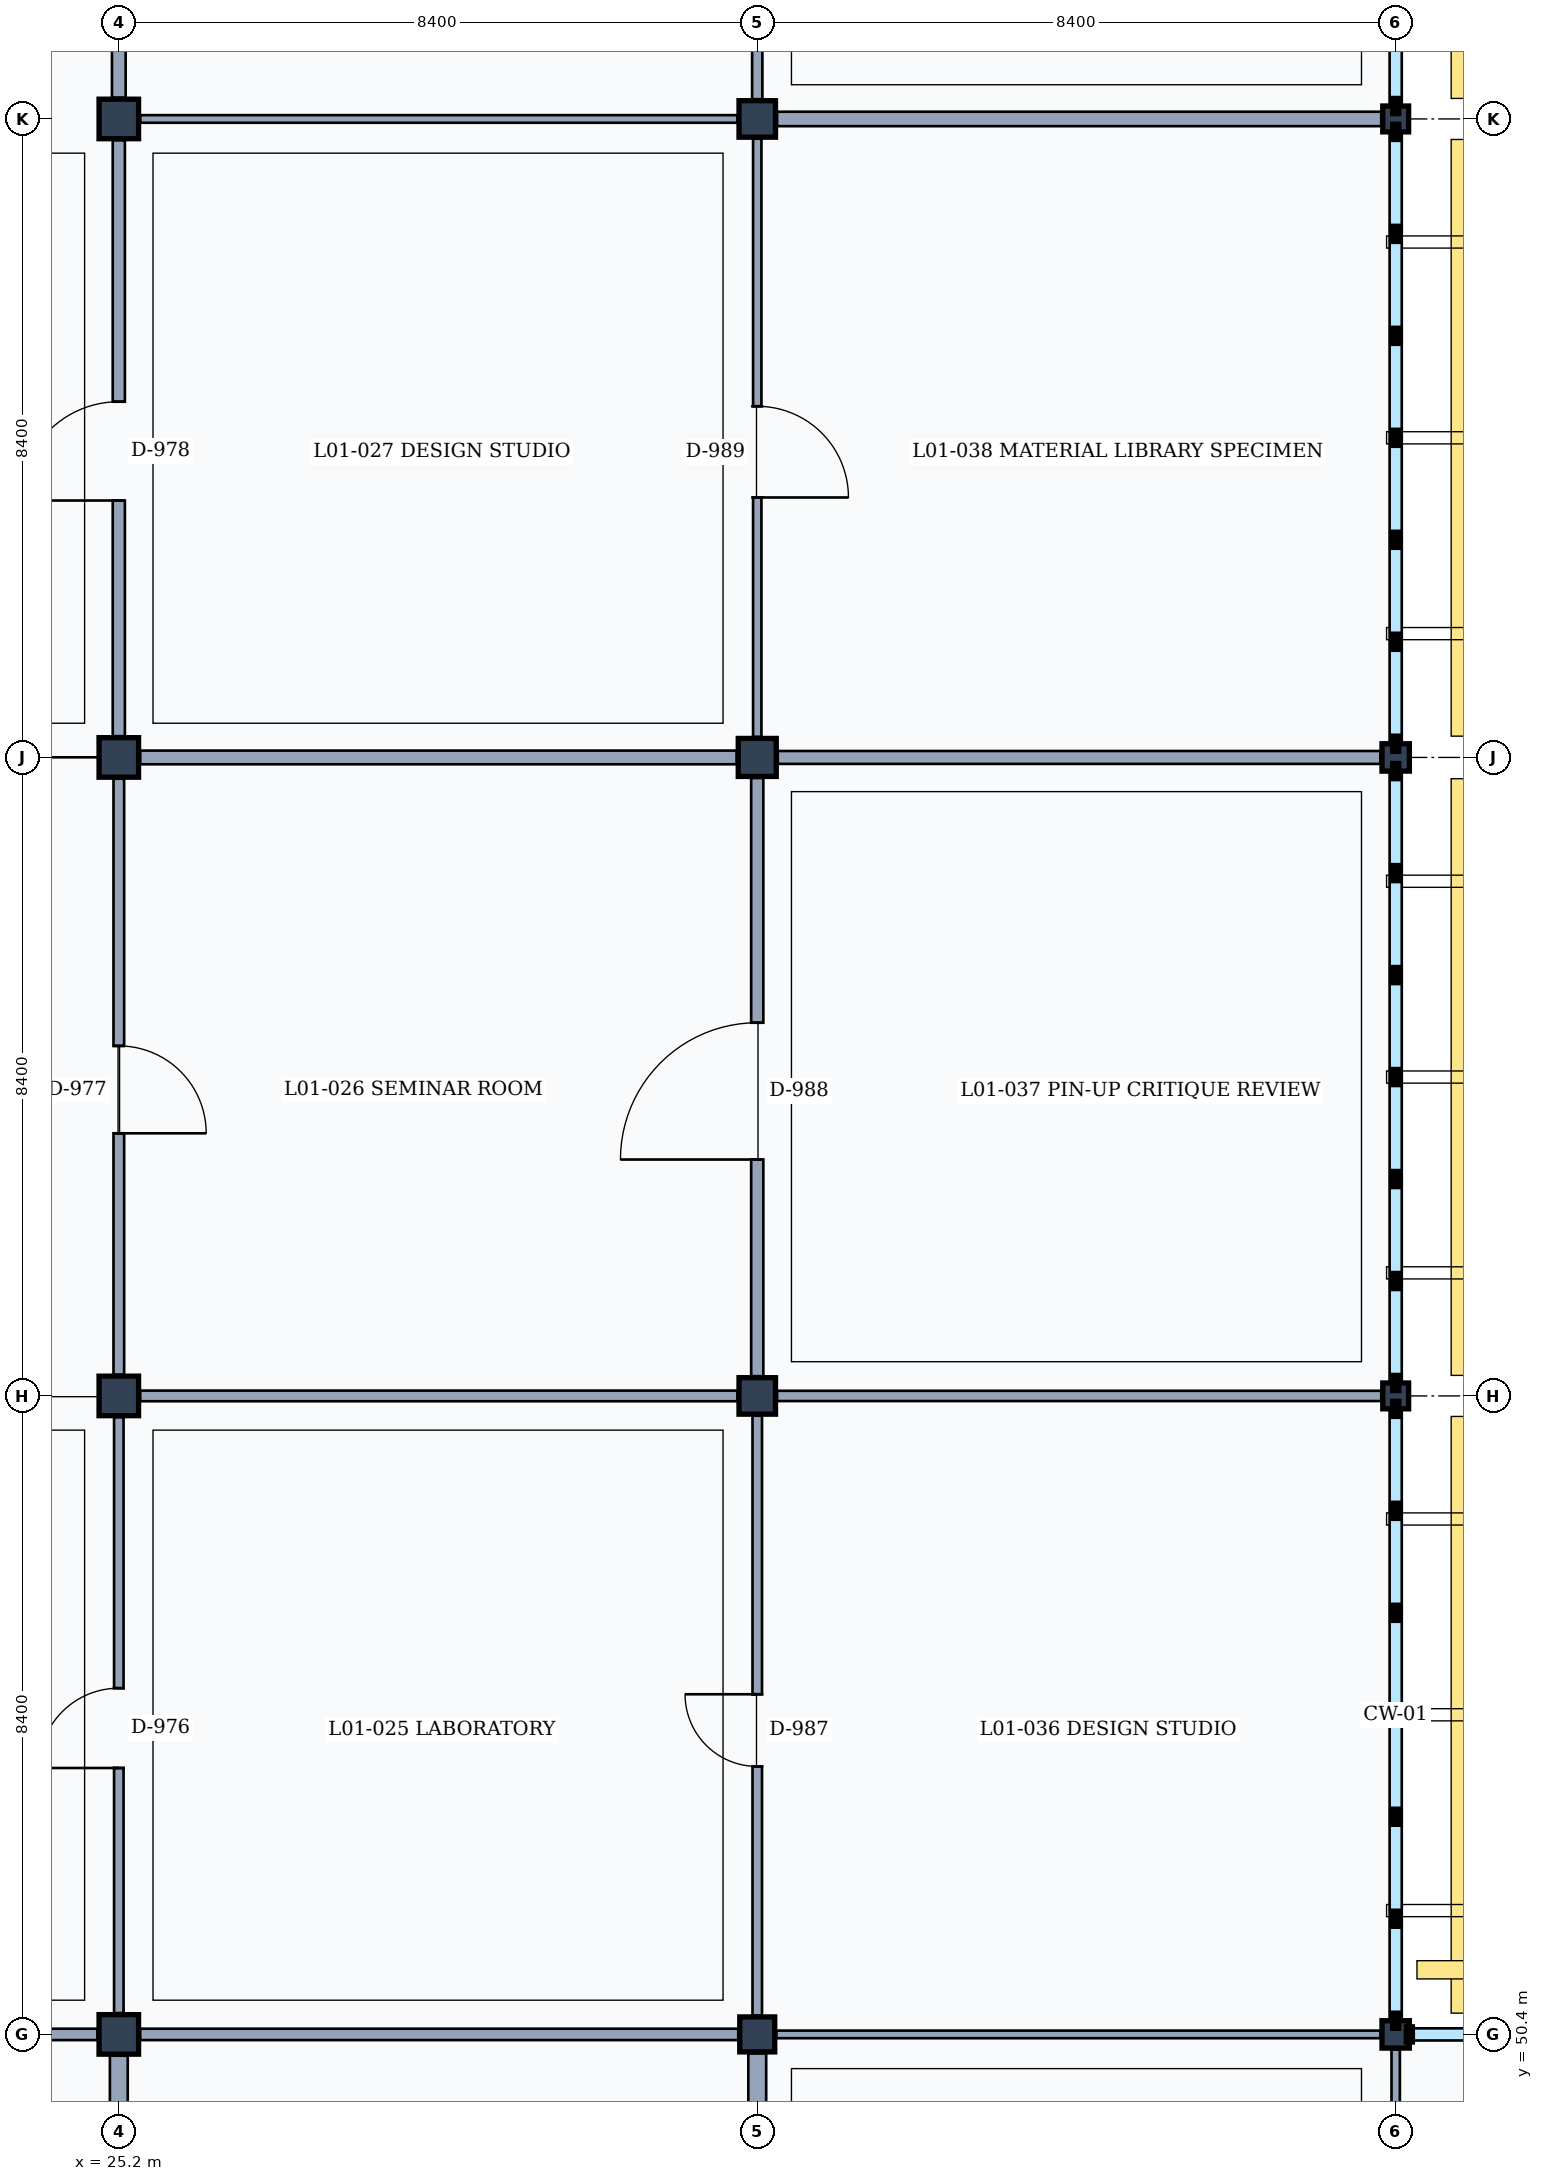
"""IFC4 building model, lengths in metres.
Left out: names, types, materials, properties, quantities, classifications, styles, units other than length and angle.
Written with IfcOpenShell. Run it as: python <this file> out.ifc"""

import sys

from ifc_helpers import new_model, si_unit, direction, frame, frame_2d, origin, origin_2d, place, context, subcontext, project, spatial, rectangle, extrude, element, fill, save


model = new_model("IFC4")
c1 = context("Model", 3, precision=1e-05, world=origin(), true_north=direction((0.0, 1.0)))
c2 = subcontext(c1, "Body", "Model", "MODEL_VIEW")
j1 = project(units=[si_unit("LENGTHUNIT", "METRE"), si_unit("PLANEANGLEUNIT", "RADIAN")], contexts=[c1])
p1 = place(None, origin())
s1 = spatial("IfcSite", under=j1, at=p1, CompositionType="ELEMENT")
p2 = place(p1, origin())
s2 = spatial("IfcBuilding", under=s1, at=p2, CompositionType="ELEMENT")
p3 = place(p2, frame((0.0, 0.0, 4.8)))
s3 = spatial("IfcBuildingStorey", under=s2, at=p3, CompositionType="ELEMENT", Elevation=4.8)
for number, where, z_axis, x_axis in (
    (1, (25.2, 50.4, 0.0), (0.0, 0.0, 1.0), (1.0, 0.0, 0.0)),
    (2, (25.2, 58.8, 0.0), (0.0, 0.0, 1.0), (1.0, 0.0, 0.0)),
    (3, (25.2, 67.2, 0.0), (0.0, 0.0, 1.0), (1.0, 0.0, 0.0)),
    (4, (25.2, 75.6, 0.0), (0.0, 0.0, 1.0), (1.0, 0.0, 0.0)),
):
    element("IfcColumn", number, at=place(p3, frame(where, z_axis=z_axis, x_axis=x_axis)), inside=s3, PredefinedType="COLUMN", context=c2, shape_type="SweptSolid", body=[
        extrude(rectangle(XDim=0.52, YDim=0.52, at=origin_2d()), origin(), (0.0, 0.0, 1.0), 4.8),
    ])
p4 = place(p3, frame((33.6, 50.4, 0.0), z_axis=(0.0, 0.0, 1.0), x_axis=(1.0, 0.0, 0.0)))
e5 = element("IfcColumn", 5, at=p4, inside=s3, PredefinedType="COLUMN", context=c2, shape_type="SweptSolid", body=[
    extrude(rectangle(XDim=0.46, YDim=0.46, at=origin_2d()), origin(), (0.0, 0.0, 1.0), 4.8),
])
p5 = place(p3, frame((33.6, 58.8, 0.0), z_axis=(0.0, 0.0, 1.0), x_axis=(1.0, 0.0, 0.0)))
e6 = element("IfcColumn", 6, at=p5, inside=s3, PredefinedType="COLUMN", context=c2, shape_type="SweptSolid", body=[
    extrude(rectangle(XDim=0.48, YDim=0.48, at=origin_2d()), origin(), (0.0, 0.0, 1.0), 4.8),
])
p6 = place(p3, frame((33.6, 67.2, 0.0), z_axis=(0.0, 0.0, 1.0), x_axis=(1.0, 0.0, 0.0)))
e7 = element("IfcColumn", 7, at=p6, inside=s3, PredefinedType="COLUMN", context=c2, shape_type="SweptSolid", body=[
    extrude(rectangle(XDim=0.5, YDim=0.5, at=origin_2d()), origin(), (0.0, 0.0, 1.0), 4.8),
])
p7 = place(p3, frame((33.6, 75.6, 0.0), z_axis=(0.0, 0.0, 1.0), x_axis=(1.0, 0.0, 0.0)))
e8 = element("IfcColumn", 8, at=p7, inside=s3, PredefinedType="COLUMN", context=c2, shape_type="SweptSolid", body=[
    extrude(rectangle(XDim=0.48, YDim=0.48, at=origin_2d()), origin(), (0.0, 0.0, 1.0), 4.8),
])
p8 = place(p3, frame((42.0, 50.4, 0.0), z_axis=(0.0, 0.0, 1.0), x_axis=(1.0, 0.0, 0.0)))
e9 = element("IfcColumn", 9, at=p8, inside=s3, PredefinedType="COLUMN", context=c2, shape_type="SweptSolid", body=[
    extrude(rectangle(XDim=0.36, YDim=0.36, at=origin_2d()), origin(), (0.0, 0.0, 1.0), 4.8),
])
p9 = place(p3, frame((42.0, 58.8, 0.0), z_axis=(0.0, 0.0, 1.0), x_axis=(1.0, 0.0, 0.0)))
e10 = element("IfcColumn", 10, at=p9, inside=s3, PredefinedType="COLUMN", context=c2, shape_type="SweptSolid", body=[
    extrude(rectangle(XDim=0.34, YDim=0.34, at=origin_2d()), origin(), (0.0, 0.0, 1.0), 4.8),
])
p10 = place(p3, frame((42.0, 67.2, 0.0), z_axis=(0.0, 0.0, 1.0), x_axis=(1.0, 0.0, 0.0)))
e11 = element("IfcColumn", 11, at=p10, inside=s3, PredefinedType="COLUMN", context=c2, shape_type="SweptSolid", body=[
    extrude(rectangle(XDim=0.36, YDim=0.36, at=origin_2d()), origin(), (0.0, 0.0, 1.0), 4.8),
])
p11 = place(p3, frame((42.0, 75.6, 0.0), z_axis=(0.0, 0.0, 1.0), x_axis=(1.0, 0.0, 0.0)))
e12 = element("IfcColumn", 12, at=p11, inside=s3, PredefinedType="COLUMN", context=c2, shape_type="SweptSolid", body=[
    extrude(rectangle(XDim=0.34, YDim=0.34, at=origin_2d()), origin(), (0.0, 0.0, 1.0), 4.8),
])
p12 = place(p3, frame((25.2, 42.23, 0.0), z_axis=(0.0, 0.0, 1.0), x_axis=(0.0, 1.0, 0.0)))
e13 = element("IfcWall", 13, at=p12, inside=s3, PredefinedType="PARTITIONING", context=c2, shape_type="SweptSolid", body=[
    extrude(rectangle(XDim=7.89, YDim=0.235, at=frame_2d((3.945, 0.0))), origin(), (0.0, 0.0, 1.0), 3.92),
])
p13 = place(p12, frame((2.925, 0.0, 0.0)))
e14 = element("IfcOpeningElement", 14, at=p13, cuts=e13, PredefinedType="OPENING", context=c2, shape_type="SweptSolid", body=[
    extrude(rectangle(XDim=1.65, YDim=2.25, at=frame_2d((0.825, 1.125))), frame((0.0, 0.127, 0.0), z_axis=(0.0, -1.0, 0.0), x_axis=(1.0, 0.0, 0.0)), (0.0, 0.0, 1.0), 0.255),
])
p14 = place(p3, frame((17.08, 50.4, 0.0), z_axis=(0.0, 0.0, 1.0), x_axis=(1.0, 0.0, 0.0)))
e15 = element("IfcWall", 15, at=p14, inside=s3, PredefinedType="PARTITIONING", context=c2, shape_type="SweptSolid", body=[
    extrude(rectangle(XDim=7.84, YDim=0.15, at=frame_2d((3.92, 0.0))), origin(), (0.0, 0.0, 1.0), 3.92),
])
p15 = place(p3, frame((25.2, 50.68, 0.0), z_axis=(0.0, 0.0, 1.0), x_axis=(0.0, 1.0, 0.0)))
e16 = element("IfcWall", 16, at=p15, inside=s3, PredefinedType="PARTITIONING", context=c2, shape_type="SweptSolid", body=[
    extrude(rectangle(XDim=7.84, YDim=0.125, at=frame_2d((3.92, 0.0))), origin(), (0.0, 0.0, 1.0), 3.92),
])
p16 = place(p15, frame((3.225, 0.0, 0.0)))
e17 = element("IfcOpeningElement", 17, at=p16, cuts=e16, PredefinedType="OPENING", context=c2, shape_type="SweptSolid", body=[
    extrude(rectangle(XDim=1.05, YDim=2.2, at=frame_2d((0.525, 1.1))), frame((0.0, 0.073, 0.0), z_axis=(0.0, -1.0, 0.0), x_axis=(1.0, 0.0, 0.0)), (0.0, 0.0, 1.0), 0.145),
])
p17 = place(p3, frame((25.2, 59.08, 0.0), z_axis=(0.0, 0.0, 1.0), x_axis=(0.0, 1.0, 0.0)))
e18 = element("IfcWall", 18, at=p17, inside=s3, PredefinedType="PARTITIONING", context=c2, shape_type="SweptSolid", body=[
    extrude(rectangle(XDim=7.84, YDim=0.14, at=frame_2d((3.92, 0.0))), origin(), (0.0, 0.0, 1.0), 3.92),
])
p18 = place(p17, frame((3.175, 0.0, 0.0)))
e19 = element("IfcOpeningElement", 19, at=p18, cuts=e18, PredefinedType="OPENING", context=c2, shape_type="SweptSolid", body=[
    extrude(rectangle(XDim=1.15, YDim=2.25, at=frame_2d((0.575, 1.125))), frame((0.0, 0.08, 0.0), z_axis=(0.0, -1.0, 0.0), x_axis=(1.0, 0.0, 0.0)), (0.0, 0.0, 1.0), 0.16),
])
p19 = place(p3, frame((25.2, 67.48, 0.0), z_axis=(0.0, 0.0, 1.0), x_axis=(0.0, 1.0, 0.0)))
e20 = element("IfcWall", 20, at=p19, inside=s3, PredefinedType="PARTITIONING", context=c2, shape_type="SweptSolid", body=[
    extrude(rectangle(XDim=7.84, YDim=0.16, at=frame_2d((3.92, 0.0))), origin(), (0.0, 0.0, 1.0), 3.92),
])
p20 = place(p19, frame((3.1, 0.0, 0.0)))
e21 = element("IfcOpeningElement", 21, at=p20, cuts=e20, PredefinedType="OPENING", context=c2, shape_type="SweptSolid", body=[
    extrude(rectangle(XDim=1.3, YDim=2.2, at=frame_2d((0.65, 1.1))), frame((0.0, 0.09, 0.0), z_axis=(0.0, -1.0, 0.0), x_axis=(1.0, 0.0, 0.0)), (0.0, 0.0, 1.0), 0.18),
])
p21 = place(p3, frame((25.2, 75.88, 0.0), z_axis=(0.0, 0.0, 1.0), x_axis=(0.0, 1.0, 0.0)))
e22 = element("IfcWall", 22, at=p21, inside=s3, PredefinedType="PARTITIONING", context=c2, shape_type="SweptSolid", body=[
    extrude(rectangle(XDim=7.84, YDim=0.18, at=frame_2d((3.92, 0.0))), origin(), (0.0, 0.0, 1.0), 3.92),
])
p22 = place(p21, frame((2.975, 0.0, 0.0)))
e23 = element("IfcOpeningElement", 23, at=p22, cuts=e22, PredefinedType="OPENING", context=c2, shape_type="SweptSolid", body=[
    extrude(rectangle(XDim=1.55, YDim=2.35, at=frame_2d((0.775, 1.175))), frame((0.0, 0.1, 0.0), z_axis=(0.0, -1.0, 0.0), x_axis=(1.0, 0.0, 0.0)), (0.0, 0.0, 1.0), 0.2),
])
p23 = place(p3, frame((33.6, 42.23, 0.0), z_axis=(0.0, 0.0, 1.0), x_axis=(0.0, 1.0, 0.0)))
e24 = element("IfcWall", 24, at=p23, inside=s3, PredefinedType="PARTITIONING", context=c2, shape_type="SweptSolid", body=[
    extrude(rectangle(XDim=7.92, YDim=0.235, at=frame_2d((3.96, 0.0))), origin(), (0.0, 0.0, 1.0), 3.92),
])
p24 = place(p23, frame((3.25, 0.0, 0.0)))
e25 = element("IfcOpeningElement", 25, at=p24, cuts=e24, PredefinedType="OPENING", context=c2, shape_type="SweptSolid", body=[
    extrude(rectangle(XDim=1.0, YDim=2.15, at=frame_2d((0.5, 1.075))), frame((0.0, 0.127, 0.0), z_axis=(0.0, -1.0, 0.0), x_axis=(1.0, 0.0, 0.0)), (0.0, 0.0, 1.0), 0.255),
])
p25 = place(p3, frame((25.48, 50.4, 0.0), z_axis=(0.0, 0.0, 1.0), x_axis=(1.0, 0.0, 0.0)))
e26 = element("IfcWall", 26, at=p25, inside=s3, PredefinedType="PARTITIONING", context=c2, shape_type="SweptSolid", body=[
    extrude(rectangle(XDim=7.87, YDim=0.15, at=frame_2d((3.935, 0.0))), origin(), (0.0, 0.0, 1.0), 3.89),
])
p26 = place(p3, frame((33.6, 50.65, 0.0), z_axis=(0.0, 0.0, 1.0), x_axis=(0.0, 1.0, 0.0)))
e27 = element("IfcWall", 27, at=p26, inside=s3, PredefinedType="PARTITIONING", context=c2, shape_type="SweptSolid", body=[
    extrude(rectangle(XDim=7.89, YDim=0.125, at=frame_2d((3.945, 0.0))), origin(), (0.0, 0.0, 1.0), 3.92),
])
p27 = place(p26, frame((3.275, 0.0, 0.0)))
e28 = element("IfcOpeningElement", 28, at=p27, cuts=e27, PredefinedType="OPENING", context=c2, shape_type="SweptSolid", body=[
    extrude(rectangle(XDim=0.95, YDim=2.15, at=frame_2d((0.475, 1.075))), frame((0.0, 0.073, 0.0), z_axis=(0.0, -1.0, 0.0), x_axis=(1.0, 0.0, 0.0)), (0.0, 0.0, 1.0), 0.145),
])
p28 = place(p3, frame((25.48, 58.8, 0.0), z_axis=(0.0, 0.0, 1.0), x_axis=(1.0, 0.0, 0.0)))
e29 = element("IfcWall", 29, at=p28, inside=s3, PredefinedType="PARTITIONING", context=c2, shape_type="SweptSolid", body=[
    extrude(rectangle(XDim=7.86, YDim=0.14, at=frame_2d((3.93, 0.0))), origin(), (0.0, 0.0, 1.0), 3.89),
])
p29 = place(p3, frame((33.6, 59.06, 0.0), z_axis=(0.0, 0.0, 1.0), x_axis=(0.0, 1.0, 0.0)))
e30 = element("IfcWall", 30, at=p29, inside=s3, PredefinedType="PARTITIONING", context=c2, shape_type="SweptSolid", body=[
    extrude(rectangle(XDim=7.87, YDim=0.16, at=frame_2d((3.935, 0.0))), origin(), (0.0, 0.0, 1.0), 3.92),
])
p30 = place(p29, frame((2.85, 0.0, 0.0)))
e31 = element("IfcOpeningElement", 31, at=p30, cuts=e30, PredefinedType="OPENING", context=c2, shape_type="SweptSolid", body=[
    extrude(rectangle(XDim=1.8, YDim=2.3, at=frame_2d((0.9, 1.15))), frame((0.0, 0.09, 0.0), z_axis=(0.0, -1.0, 0.0), x_axis=(1.0, 0.0, 0.0)), (0.0, 0.0, 1.0), 0.18),
])
p31 = place(p3, frame((25.48, 67.2, 0.0), z_axis=(0.0, 0.0, 1.0), x_axis=(1.0, 0.0, 0.0)))
e32 = element("IfcWall", 32, at=p31, inside=s3, PredefinedType="PARTITIONING", context=c2, shape_type="SweptSolid", body=[
    extrude(rectangle(XDim=7.85, YDim=0.18, at=frame_2d((3.925, 0.0))), origin(), (0.0, 0.0, 1.0), 3.89),
])
p32 = place(p3, frame((33.6, 67.47, 0.0), z_axis=(0.0, 0.0, 1.0), x_axis=(0.0, 1.0, 0.0)))
e33 = element("IfcWall", 33, at=p32, inside=s3, PredefinedType="PARTITIONING", context=c2, shape_type="SweptSolid", body=[
    extrude(rectangle(XDim=7.87, YDim=0.11, at=frame_2d((3.935, 0.0))), origin(), (0.0, 0.0, 1.0), 3.92),
])
p33 = place(p32, frame((3.15, 0.0, 0.0)))
e34 = element("IfcOpeningElement", 34, at=p33, cuts=e33, PredefinedType="OPENING", context=c2, shape_type="SweptSolid", body=[
    extrude(rectangle(XDim=1.2, YDim=2.2, at=frame_2d((0.6, 1.1))), frame((0.0, 0.065, 0.0), z_axis=(0.0, -1.0, 0.0), x_axis=(1.0, 0.0, 0.0)), (0.0, 0.0, 1.0), 0.13),
])
p34 = place(p3, frame((25.48, 75.6, 0.0), z_axis=(0.0, 0.0, 1.0), x_axis=(1.0, 0.0, 0.0)))
e35 = element("IfcWall", 35, at=p34, inside=s3, PredefinedType="MOVABLE", context=c2, shape_type="SweptSolid", body=[
    extrude(rectangle(XDim=7.86, YDim=0.1, at=frame_2d((3.93, 0.0))), origin(), (0.0, 0.0, 1.0), 3.89),
])
p35 = place(p3, frame((33.6, 75.86, 0.0), z_axis=(0.0, 0.0, 1.0), x_axis=(0.0, 1.0, 0.0)))
e36 = element("IfcWall", 36, at=p35, inside=s3, PredefinedType="PARTITIONING", context=c2, shape_type="SweptSolid", body=[
    extrude(rectangle(XDim=7.87, YDim=0.135, at=frame_2d((3.935, 0.0))), origin(), (0.0, 0.0, 1.0), 3.92),
])
p36 = place(p3, frame((42.0, 42.23, 0.0), z_axis=(0.0, 0.0, 1.0), x_axis=(0.0, 1.0, 0.0)))
e37 = element("IfcWall", 37, at=p36, inside=s3, PredefinedType="PARTITIONING", context=c2, shape_type="SweptSolid", body=[
    extrude(rectangle(XDim=7.97, YDim=0.11, at=frame_2d((3.985, 0.0))), origin(), (0.0, 0.0, 1.0), 3.92),
])
p37 = place(p3, frame((33.85, 50.4, 0.0), z_axis=(0.0, 0.0, 1.0), x_axis=(1.0, 0.0, 0.0)))
e38 = element("IfcWall", 38, at=p37, inside=s3, PredefinedType="MOVABLE", context=c2, shape_type="SweptSolid", body=[
    extrude(rectangle(XDim=7.95, YDim=0.1, at=frame_2d((3.975, 0.0))), origin(), (0.0, 0.0, 1.0), 3.89),
])
p38 = place(p3, frame((33.86, 58.8, 0.0), z_axis=(0.0, 0.0, 1.0), x_axis=(1.0, 0.0, 0.0)))
e39 = element("IfcWall", 39, at=p38, inside=s3, PredefinedType="PARTITIONING", context=c2, shape_type="SweptSolid", body=[
    extrude(rectangle(XDim=7.95, YDim=0.135, at=frame_2d((3.975, 0.0))), origin(), (0.0, 0.0, 1.0), 3.89),
])
p39 = place(p3, frame((33.87, 67.2, 0.0), z_axis=(0.0, 0.0, 1.0), x_axis=(1.0, 0.0, 0.0)))
e40 = element("IfcWall", 40, at=p39, inside=s3, PredefinedType="PARTITIONING", context=c2, shape_type="SweptSolid", body=[
    extrude(rectangle(XDim=7.93, YDim=0.17, at=frame_2d((3.965, 0.0))), origin(), (0.0, 0.0, 1.0), 3.89),
])
p40 = place(p3, frame((33.86, 75.6, 0.0), z_axis=(0.0, 0.0, 1.0), x_axis=(1.0, 0.0, 0.0)))
e41 = element("IfcWall", 41, at=p40, inside=s3, PredefinedType="PARTITIONING", context=c2, shape_type="SweptSolid", body=[
    extrude(rectangle(XDim=7.95, YDim=0.19, at=frame_2d((3.975, 0.0))), origin(), (0.0, 0.0, 1.0), 3.89),
])
p41 = place(p16, origin())
e42 = element("IfcDoor", 42, at=p41, inside=s3, OperationType="SINGLE_SWING_LEFT", PredefinedType="DOOR", context=c2, shape_type="SweptSolid", body=[
    extrude(rectangle(XDim=1.05, YDim=2.2, at=frame_2d((0.525, 1.1))), frame((0.0, 0.025, 0.0), z_axis=(0.0, -1.0, 0.0), x_axis=(1.0, 0.0, 0.0)), (0.0, 0.0, 1.0), 0.05),
])
fill(e17, e42)
p42 = place(p18, frame((1.15, 0.0, 0.0), z_axis=(0.0, 0.0, 1.0), x_axis=(-1.0, 0.0, 0.0)))
e43 = element("IfcDoor", 43, at=p42, inside=s3, OperationType="SINGLE_SWING_RIGHT", PredefinedType="DOOR", context=c2, shape_type="SweptSolid", body=[
    extrude(rectangle(XDim=1.15, YDim=2.25, at=frame_2d((0.575, 1.125))), frame((0.0, 0.025, 0.0), z_axis=(0.0, -1.0, 0.0), x_axis=(1.0, 0.0, 0.0)), (0.0, 0.0, 1.0), 0.05),
])
fill(e19, e43)
p43 = place(p20, origin())
e44 = element("IfcDoor", 44, at=p43, inside=s3, OperationType="SINGLE_SWING_LEFT", PredefinedType="DOOR", context=c2, shape_type="SweptSolid", body=[
    extrude(rectangle(XDim=1.3, YDim=2.2, at=frame_2d((0.65, 1.1))), frame((0.0, 0.025, 0.0), z_axis=(0.0, -1.0, 0.0), x_axis=(1.0, 0.0, 0.0)), (0.0, 0.0, 1.0), 0.05),
])
fill(e21, e44)
p44 = place(p27, origin())
e45 = element("IfcDoor", 45, at=p44, inside=s3, OperationType="SINGLE_SWING_RIGHT", PredefinedType="DOOR", context=c2, shape_type="SweptSolid", body=[
    extrude(rectangle(XDim=0.95, YDim=2.15, at=frame_2d((0.475, 1.075))), frame((0.0, 0.025, 0.0), z_axis=(0.0, -1.0, 0.0), x_axis=(1.0, 0.0, 0.0)), (0.0, 0.0, 1.0), 0.05),
])
fill(e28, e45)
p45 = place(p30, origin())
e46 = element("IfcDoor", 46, at=p45, inside=s3, OperationType="SINGLE_SWING_LEFT", PredefinedType="DOOR", context=c2, shape_type="SweptSolid", body=[
    extrude(rectangle(XDim=1.8, YDim=2.3, at=frame_2d((0.9, 1.15))), frame((0.0, 0.025, 0.0), z_axis=(0.0, -1.0, 0.0), x_axis=(1.0, 0.0, 0.0)), (0.0, 0.0, 1.0), 0.05),
])
fill(e31, e46)
p46 = place(p33, frame((1.2, 0.0, 0.0), z_axis=(0.0, 0.0, 1.0), x_axis=(-1.0, 0.0, 0.0)))
e47 = element("IfcDoor", 47, at=p46, inside=s3, OperationType="SINGLE_SWING_RIGHT", PredefinedType="DOOR", context=c2, shape_type="SweptSolid", body=[
    extrude(rectangle(XDim=1.2, YDim=2.2, at=frame_2d((0.6, 1.1))), frame((0.0, 0.025, 0.0), z_axis=(0.0, -1.0, 0.0), x_axis=(1.0, 0.0, 0.0)), (0.0, 0.0, 1.0), 0.05),
])
fill(e34, e47)
save(model, sys.argv[1])
